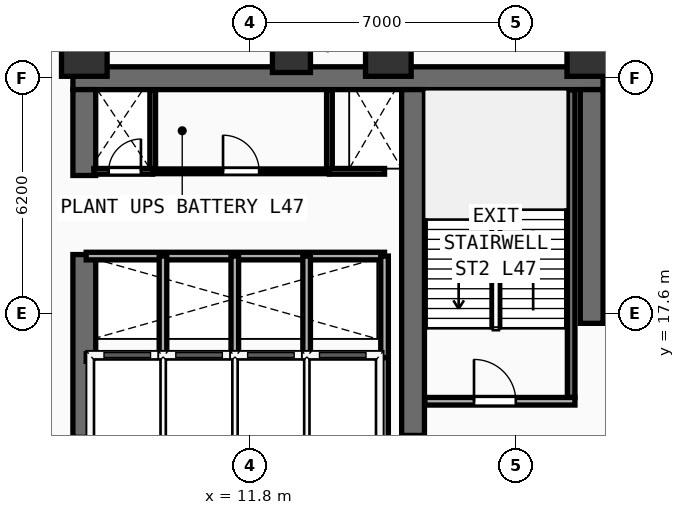
"""IFC4 building model, lengths in metres.
Left out: names, types, materials, properties, quantities, classifications, styles, units other than length and angle.
Written with IfcOpenShell. Run it as: python <this file> out.ifc"""

import sys

from ifc_helpers import new_model, si_unit, direction, frame, frame_2d, origin, origin_2d, place, context, subcontext, project, spatial, rectangle, extrude, element, fill, save


model = new_model("IFC4")
c1 = context("Model", 3, precision=1e-05, world=origin(), true_north=direction((0.0, 1.0)))
c2 = subcontext(c1, "Body", "Model", "MODEL_VIEW")
j1 = project(units=[si_unit("LENGTHUNIT", "METRE"), si_unit("PLANEANGLEUNIT", "RADIAN")], contexts=[c1])
p1 = place(None, origin())
s1 = spatial("IfcSite", under=j1, at=p1, CompositionType="ELEMENT")
p2 = place(p1, origin())
s2 = spatial("IfcBuilding", under=s1, at=p2, CompositionType="ELEMENT")
p3 = place(p2, frame((0.0, 0.0, 184.2)))
s3 = spatial("IfcBuildingStorey", under=s2, at=p3, CompositionType="ELEMENT", Elevation=184.2)
p4 = place(p3, frame((7.15, 23.8, 0.0), z_axis=(0.0, 0.0, 1.0), x_axis=(1.0, 0.0, 0.0)))
e1 = element("IfcWall", 1, at=p4, inside=s3, PredefinedType="SHEAR", context=c2, shape_type="SweptSolid", body=[
    extrude(rectangle(XDim=13.95, YDim=0.6, at=frame_2d((6.975, 0.0))), origin(), (0.0, 0.0, 1.0), 3.56),
])
p5 = place(p3, frame((7.45, 14.35, 0.0), z_axis=(0.0, 0.0, 1.0), x_axis=(0.0, 1.0, 0.0)))
e2 = element("IfcWall", 2, at=p5, inside=s3, PredefinedType="SHEAR", context=c2, shape_type="SweptSolid", body=[
    extrude(rectangle(XDim=4.81, YDim=0.6, at=frame_2d((2.405, 0.0))), origin(), (0.0, 0.0, 1.0), 3.56),
])
p6 = place(p3, frame((7.45, 21.24, 0.0), z_axis=(0.0, 0.0, 1.0), x_axis=(0.0, 1.0, 0.0)))
e3 = element("IfcWall", 3, at=p6, inside=s3, PredefinedType="SHEAR", context=c2, shape_type="SweptSolid", body=[
    extrude(rectangle(XDim=2.26, YDim=0.6, at=frame_2d((1.13, 0.0))), origin(), (0.0, 0.0, 1.0), 3.56),
])
p7 = place(p3, frame((20.8, 17.35, 0.0), z_axis=(0.0, 0.0, 1.0), x_axis=(0.0, 1.0, 0.0)))
e4 = element("IfcWall", 4, at=p7, inside=s3, PredefinedType="SHEAR", context=c2, shape_type="SweptSolid", body=[
    extrude(rectangle(XDim=6.15, YDim=0.6, at=frame_2d((3.075, 0.0))), origin(), (0.0, 0.0, 1.0), 3.56),
])
p8 = place(p3, frame((16.1, 14.4, 0.0), z_axis=(0.0, 0.0, 1.0), x_axis=(0.0, 1.0, 0.0)))
e5 = element("IfcWall", 5, at=p8, inside=s3, PredefinedType="SHEAR", context=c2, shape_type="SweptSolid", body=[
    extrude(rectangle(XDim=9.1, YDim=0.6, at=frame_2d((4.55, 0.0))), origin(), (0.0, 0.0, 1.0), 3.56),
])
for number, where, z_axis, x_axis in (
    (6, (7.45, 24.45, 0.0), (0.0, 0.0, 1.0), (1.0, 0.0, 0.0)),
    (7, (15.45, 24.45, 0.0), (0.0, 0.0, 1.0), (1.0, 0.0, 0.0)),
    (8, (20.75, 24.45, 0.0), (0.0, 0.0, 1.0), (1.0, 0.0, 0.0)),
):
    element("IfcColumn", number, at=place(p3, frame(where, z_axis=z_axis, x_axis=x_axis)), inside=s3, PredefinedType="COLUMN", context=c2, shape_type="SweptSolid", body=[
        extrude(rectangle(XDim=1.2, YDim=1.2, at=origin_2d()), origin(), (0.0, 0.0, 1.0), 3.56),
    ])
p9 = place(p3, frame((12.9, 24.45, 0.0), z_axis=(0.0, 0.0, 1.0), x_axis=(1.0, 0.0, 0.0)))
e9 = element("IfcColumn", 9, at=p9, inside=s3, PredefinedType="COLUMN", context=c2, shape_type="SweptSolid", body=[
    extrude(rectangle(XDim=1.0, YDim=1.0, at=origin_2d()), origin(), (0.0, 0.0, 1.0), 3.56),
])
p10 = place(p3, frame((20.26, 15.4, 0.0), z_axis=(0.0, 0.0, 1.0), x_axis=(0.0, 1.0, 0.0)))
e10 = element("IfcWall", 10, at=p10, inside=s3, PredefinedType="SHEAR", context=c2, shape_type="SweptSolid", body=[
    extrude(rectangle(XDim=8.09, YDim=0.2, at=frame_2d((4.045, 0.0))), origin(), (0.0, 0.0, 1.0), 3.56),
])
p11 = place(p3, frame((16.41, 15.3, 0.0), z_axis=(0.0, 0.0, 1.0), x_axis=(1.0, 0.0, 0.0)))
e11 = element("IfcWall", 11, at=p11, inside=s3, PredefinedType="PARTITIONING", context=c2, shape_type="SweptSolid", body=[
    extrude(rectangle(XDim=3.95, YDim=0.2, at=frame_2d((1.975, 0.0))), origin(), (0.0, 0.0, 1.0), 3.56),
])
p12 = place(p11, frame((1.294, 0.0, 0.0)))
e12 = element("IfcOpeningElement", 12, at=p12, cuts=e11, PredefinedType="OPENING", context=c2, shape_type="SweptSolid", body=[
    extrude(rectangle(XDim=1.1, YDim=2.2, at=frame_2d((0.55, 1.1))), frame((0.0, 0.11, 0.0), z_axis=(0.0, -1.0, 0.0), x_axis=(1.0, 0.0, 0.0)), (0.0, 0.0, 1.0), 0.22),
])
p13 = place(p3, frame((7.5, 16.45, 0.0), z_axis=(0.0, 0.0, 1.0), x_axis=(1.0, 0.0, 0.0)))
e13 = element("IfcWall", 13, at=p13, inside=s3, PredefinedType="PARTITIONING", context=c2, shape_type="SweptSolid", body=[
    extrude(rectangle(XDim=7.85, YDim=0.2, at=frame_2d((3.925, 0.0))), origin(), (0.0, 0.0, 1.0), 3.56),
])
for number, where, z_axis, x_axis in (
    (14, (15.35, 14.22, 0.0), (0.0, 0.0, 1.0), (0.0, 1.0, 0.0)),
    (15, (9.52, 14.22, 0.0), (0.0, 0.0, 1.0), (0.0, 1.0, 0.0)),
    (16, (11.41, 14.22, 0.0), (0.0, 0.0, 1.0), (0.0, 1.0, 0.0)),
    (17, (13.3, 14.22, 0.0), (0.0, 0.0, 1.0), (0.0, 1.0, 0.0)),
):
    element("IfcWall", number, at=place(p3, frame(where, z_axis=z_axis, x_axis=x_axis)), inside=s3, PredefinedType="PARTITIONING", context=c2, shape_type="SweptSolid", body=[
        extrude(rectangle(XDim=2.23, YDim=0.2, at=frame_2d((1.115, 0.0))), origin(), (0.0, 0.0, 1.0), 3.56),
    ])
p14 = place(p3, frame((7.5, 19.12, 0.0), z_axis=(0.0, 0.0, 1.0), x_axis=(1.0, 0.0, 0.0)))
e18 = element("IfcWall", 18, at=p14, inside=s3, PredefinedType="PARTITIONING", context=c2, shape_type="SweptSolid", body=[
    extrude(rectangle(XDim=7.85, YDim=0.2, at=frame_2d((3.925, 0.0))), origin(), (0.0, 0.0, 1.0), 3.56),
])
for number, where, z_axis, x_axis in (
    (19, (15.35, 16.45, 0.0), (0.0, 0.0, 1.0), (0.0, 1.0, 0.0)),
    (20, (9.52, 16.45, 0.0), (0.0, 0.0, 1.0), (0.0, 1.0, 0.0)),
    (21, (11.41, 16.45, 0.0), (0.0, 0.0, 1.0), (0.0, 1.0, 0.0)),
    (22, (13.3, 16.45, 0.0), (0.0, 0.0, 1.0), (0.0, 1.0, 0.0)),
):
    element("IfcWall", number, at=place(p3, frame(where, z_axis=z_axis, x_axis=x_axis)), inside=s3, PredefinedType="PARTITIONING", context=c2, shape_type="SweptSolid", body=[
        extrude(rectangle(XDim=2.67, YDim=0.2, at=frame_2d((1.335, 0.0))), origin(), (0.0, 0.0, 1.0), 3.56),
    ])
for number, where, z_axis, x_axis in (
    (23, (9.25, 21.35, 0.0), (0.0, 0.0, 1.0), (0.0, 1.0, 0.0)),
    (24, (13.9, 21.35, 0.0), (0.0, 0.0, 1.0), (0.0, 1.0, 0.0)),
):
    element("IfcWall", number, at=place(p3, frame(where, z_axis=z_axis, x_axis=x_axis)), inside=s3, PredefinedType="PARTITIONING", context=c2, shape_type="SweptSolid", body=[
        extrude(rectangle(XDim=2.13, YDim=0.15, at=frame_2d((1.065, 0.0))), origin(), (0.0, 0.0, 1.0), 3.56),
    ])
p15 = place(p3, frame((7.7, 21.35, 0.0), z_axis=(0.0, 0.0, 1.0), x_axis=(1.0, 0.0, 0.0)))
e25 = element("IfcWall", 25, at=p15, inside=s3, PredefinedType="PARTITIONING", context=c2, shape_type="SweptSolid", body=[
    extrude(rectangle(XDim=1.55, YDim=0.15, at=frame_2d((0.775, 0.0))), origin(), (0.0, 0.0, 1.0), 3.56),
])
p16 = place(p15, frame((0.39, 0.0, 0.0)))
e26 = element("IfcOpeningElement", 26, at=p16, cuts=e25, PredefinedType="OPENING", context=c2, shape_type="SweptSolid", body=[
    extrude(rectangle(XDim=0.85, YDim=2.15, at=frame_2d((0.425, 1.075))), frame((0.0, 0.085, 0.0), z_axis=(0.0, -1.0, 0.0), x_axis=(1.0, 0.0, 0.0)), (0.0, 0.0, 1.0), 0.17),
])
p17 = place(p3, frame((13.9, 21.35, 0.0), z_axis=(0.0, 0.0, 1.0), x_axis=(1.0, 0.0, 0.0)))
e27 = element("IfcWall", 27, at=p17, inside=s3, PredefinedType="PARTITIONING", context=c2, shape_type="SweptSolid", body=[
    extrude(rectangle(XDim=1.45, YDim=0.15, at=frame_2d((0.725, 0.0))), origin(), (0.0, 0.0, 1.0), 3.56),
])
p18 = place(p3, frame((9.25, 21.35, 0.0), z_axis=(0.0, 0.0, 1.0), x_axis=(1.0, 0.0, 0.0)))
e28 = element("IfcWall", 28, at=p18, inside=s3, PredefinedType="PARTITIONING", context=c2, shape_type="SweptSolid", body=[
    extrude(rectangle(XDim=4.65, YDim=0.125, at=frame_2d((2.325, 0.0))), origin(), (0.0, 0.0, 1.0), 3.56),
])
p19 = place(p18, frame((1.85, 0.0, 0.0)))
e29 = element("IfcOpeningElement", 29, at=p19, cuts=e28, PredefinedType="OPENING", context=c2, shape_type="SweptSolid", body=[
    extrude(rectangle(XDim=0.95, YDim=2.15, at=frame_2d((0.475, 1.075))), frame((0.0, 0.073, 0.0), z_axis=(0.0, -1.0, 0.0), x_axis=(1.0, 0.0, 0.0)), (0.0, 0.0, 1.0), 0.145),
])
p20 = place(p12, origin())
e30 = element("IfcDoor", 30, at=p20, inside=s3, OperationType="SINGLE_SWING_LEFT", PredefinedType="DOOR", context=c2, shape_type="SweptSolid", body=[
    extrude(rectangle(XDim=1.1, YDim=2.2, at=frame_2d((0.55, 1.1))), frame((0.0, 0.025, 0.0), z_axis=(0.0, -1.0, 0.0), x_axis=(1.0, 0.0, 0.0)), (0.0, 0.0, 1.0), 0.05),
])
fill(e12, e30)
p21 = place(p16, origin())
e31 = element("IfcDoor", 31, at=p21, inside=s3, OperationType="SINGLE_SWING_RIGHT", PredefinedType="DOOR", context=c2, shape_type="SweptSolid", body=[
    extrude(rectangle(XDim=0.85, YDim=2.15, at=frame_2d((0.425, 1.075))), frame((0.0, 0.025, 0.0), z_axis=(0.0, -1.0, 0.0), x_axis=(1.0, 0.0, 0.0)), (0.0, 0.0, 1.0), 0.05),
])
fill(e26, e31)
p22 = place(p19, origin())
e32 = element("IfcDoor", 32, at=p22, inside=s3, OperationType="SINGLE_SWING_LEFT", PredefinedType="DOOR", context=c2, shape_type="SweptSolid", body=[
    extrude(rectangle(XDim=0.95, YDim=2.15, at=frame_2d((0.475, 1.075))), frame((0.0, 0.025, 0.0), z_axis=(0.0, -1.0, 0.0), x_axis=(1.0, 0.0, 0.0)), (0.0, 0.0, 1.0), 0.05),
])
fill(e29, e32)
save(model, sys.argv[1])
